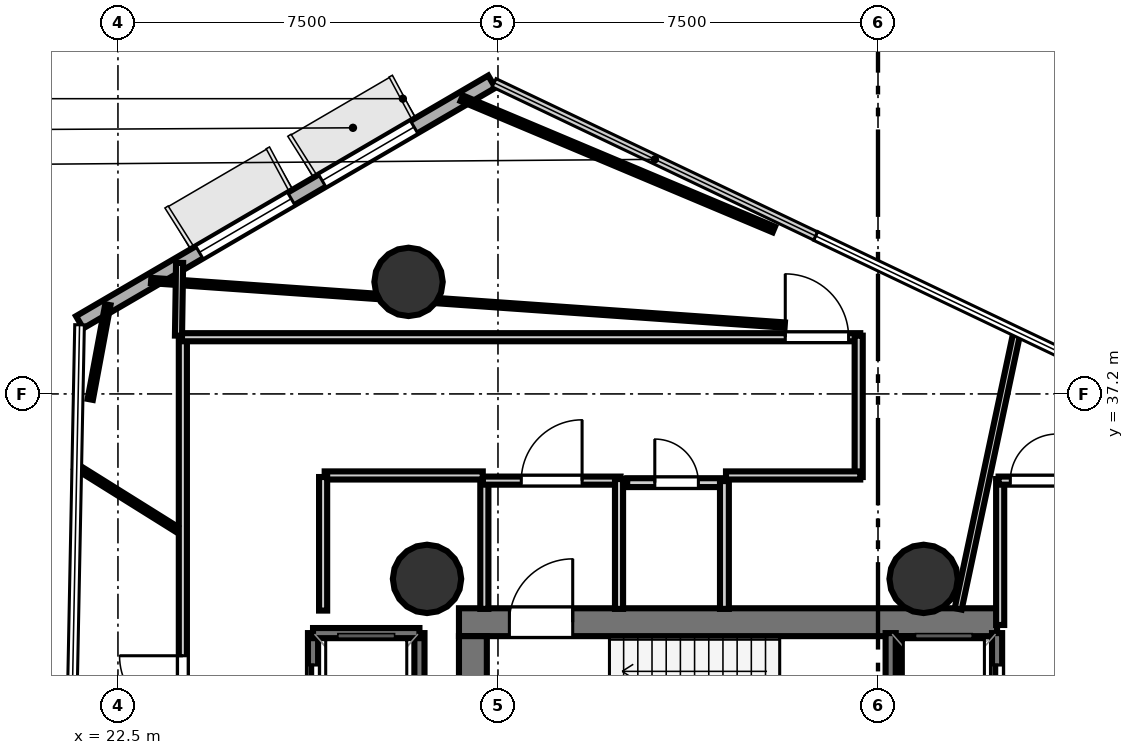
"""IFC4 building model, lengths in metres.
Left out: names, types, materials, properties, quantities, classifications, styles, units other than length and angle.
Written with IfcOpenShell. Run it as: python <this file> out.ifc"""

import sys

from ifc_helpers import new_model, si_unit, direction, frame, frame_2d, origin, origin_2d, place, context, subcontext, project, spatial, rectangle, hollow_circle, extrude, element, fill, save


model = new_model("IFC4")
c1 = context("Model", 3, precision=1e-05, world=origin(), true_north=direction((0.0, 1.0)))
c2 = subcontext(c1, "Body", "Model", "MODEL_VIEW")
j1 = project(units=[si_unit("LENGTHUNIT", "METRE"), si_unit("PLANEANGLEUNIT", "RADIAN")], contexts=[c1])
p1 = place(None, origin())
s1 = spatial("IfcSite", under=j1, at=p1, CompositionType="ELEMENT")
p2 = place(p1, origin())
s2 = spatial("IfcBuilding", under=s1, at=p2, CompositionType="ELEMENT")
p3 = place(p2, frame((0.0, 0.0, 143.1)))
s3 = spatial("IfcBuildingStorey", under=s2, at=p3, CompositionType="ELEMENT", Elevation=143.1)
p4 = place(p3, frame((29.23, 32.695, 0.0), z_axis=(0.0, 0.0, 1.0), x_axis=(1.0, 0.0, 0.0)))
e1 = element("IfcWall", 1, at=p4, inside=s3, PredefinedType="SHEAR", context=c2, shape_type="SweptSolid", body=[
    extrude(rectangle(XDim=10.62, YDim=0.55, at=frame_2d((5.31, 0.0))), origin(), (0.0, 0.0, 1.0), 4.32),
])
p5 = place(p4, frame((0.995, 0.0, 0.0)))
e2 = element("IfcOpeningElement", 2, at=p5, cuts=e1, PredefinedType="OPENING", context=c2, shape_type="SweptSolid", body=[
    extrude(rectangle(XDim=1.25, YDim=2.15, at=frame_2d((0.625, 1.075))), frame((0.0, 0.285, 0.0), z_axis=(0.0, -1.0, 0.0), x_axis=(1.0, 0.0, 0.0)), (0.0, 0.0, 1.0), 0.57),
])
p6 = place(p3, frame((29.505, 24.98, 0.0), z_axis=(0.0, 0.0, 1.0), x_axis=(0.0, 1.0, 0.0)))
e3 = element("IfcWall", 3, at=p6, inside=s3, PredefinedType="SHEAR", context=c2, shape_type="SweptSolid", body=[
    extrude(rectangle(XDim=7.44, YDim=0.55, at=frame_2d((3.72, 0.0))), origin(), (0.0, 0.0, 1.0), 4.32),
])
p7 = place(p3, frame((38.18, 24.98, 0.0), z_axis=(0.0, 0.0, 1.0), x_axis=(0.0, 1.0, 0.0)))
e4 = element("IfcWall", 4, at=p7, inside=s3, PredefinedType="SHEAR", context=c2, shape_type="SweptSolid", body=[
    extrude(rectangle(XDim=7.44, YDim=0.5, at=frame_2d((3.72, 0.0))), origin(), (0.0, 0.0, 1.0), 4.32),
])
for number, where, z_axis, x_axis in (
    (5, (28.6, 33.55, 0.0), (0.0, 0.0, 1.0), (1.0, 0.0, 0.0)),
    (6, (38.4, 33.55, 0.0), (0.0, 0.0, 1.0), (1.0, 0.0, 0.0)),
):
    element("IfcColumn", number, at=place(p3, frame(where, z_axis=z_axis, x_axis=x_axis)), inside=s3, PredefinedType="COLUMN", context=c2, shape_type="SweptSolid", body=[
        extrude(hollow_circle(Radius=0.675, WallThickness=0.032, at=origin_2d()), origin(), (0.0, 0.0, 1.0), 4.5),
    ])
p8 = place(p3, frame((28.235, 39.411, -0.27), z_axis=(0.0, 0.0, 1.0), x_axis=(1.0, 0.0, 0.0)))
e7 = element("IfcColumn", 7, at=p8, inside=s3, PredefinedType="COLUMN", context=c2, shape_type="SweptSolid", body=[
    extrude(hollow_circle(Radius=0.675, WallThickness=0.032, at=origin_2d()), origin(), (0.0, 0.0, 1.0), 4.77),
])
p9 = place(p3, frame((29.878, 43.362, 0.0), z_axis=(0.0, 0.0, 1.0), x_axis=(-0.863698041635, -0.504009615857, 0.0)))
e8 = element("IfcWall", 8, at=p9, inside=s3, PredefinedType="SOLIDWALL", context=c2, shape_type="SweptSolid", body=[
    extrude(rectangle(XDim=9.419, YDim=0.28, at=frame_2d((4.709, 0.0))), origin(), (0.0, 0.0, 1.0), 4.32),
])
p10 = place(p9, frame((1.776, 0.0, 0.85)))
e9 = element("IfcOpeningElement", 9, at=p10, cuts=e8, PredefinedType="OPENING", context=c2, shape_type="SweptSolid", body=[
    extrude(rectangle(XDim=2.1, YDim=2.2, at=frame_2d((1.05, 1.1))), frame((0.0, 0.15, 0.0), z_axis=(0.0, -1.0, 0.0), x_axis=(1.0, 0.0, 0.0)), (0.0, 0.0, 1.0), 0.3),
])
p11 = place(p9, frame((4.583, 0.0, 0.85)))
e10 = element("IfcOpeningElement", 10, at=p11, cuts=e8, PredefinedType="OPENING", context=c2, shape_type="SweptSolid", body=[
    extrude(rectangle(XDim=2.1, YDim=2.2, at=frame_2d((1.05, 1.1))), frame((0.0, 0.15, 0.0), z_axis=(0.0, -1.0, 0.0), x_axis=(1.0, 0.0, 0.0)), (0.0, 0.0, 1.0), 0.3),
])
p12 = place(p3, frame((39.85, 30.12, 0.0), z_axis=(0.0, 0.0, 1.0), x_axis=(0.0, 1.0, 0.0)))
e11 = element("IfcWall", 11, at=p12, inside=s3, PredefinedType="SOLIDWALL", context=c2, shape_type="SweptSolid", body=[
    extrude(rectangle(XDim=2.36, YDim=0.2, at=frame_2d((1.18, 0.0))), origin(), (0.0, 0.0, 1.0), 4.32),
])
p13 = place(p12, frame((0.63, 0.0, 0.0)))
e12 = element("IfcOpeningElement", 12, at=p13, cuts=e11, PredefinedType="OPENING", context=c2, shape_type="SweptSolid", body=[
    extrude(rectangle(XDim=1.1, YDim=2.15, at=frame_2d((0.55, 1.075))), frame((0.0, 0.11, 0.0), z_axis=(0.0, -1.0, 0.0), x_axis=(1.0, 0.0, 0.0)), (0.0, 0.0, 1.0), 0.22),
])
for number, where, z_axis, x_axis in (
    (13, (37.75, 30.12, 0.0), (0.0, 0.0, 1.0), (0.0, 1.0, 0.0)),
    (14, (28.45, 30.12, 0.0), (0.0, 0.0, 1.0), (0.0, 1.0, 0.0)),
):
    element("IfcWall", number, at=place(p3, frame(where, z_axis=z_axis, x_axis=x_axis)), inside=s3, PredefinedType="SOLIDWALL", context=c2, shape_type="SweptSolid", body=[
        extrude(rectangle(XDim=2.36, YDim=0.2, at=frame_2d((1.18, 0.0))), origin(), (0.0, 0.0, 1.0), 4.32),
    ])
p14 = place(p3, frame((26.35, 30.12, 0.0), z_axis=(0.0, 0.0, 1.0), x_axis=(0.0, 1.0, 0.0)))
e15 = element("IfcWall", 15, at=p14, inside=s3, PredefinedType="SOLIDWALL", context=c2, shape_type="SweptSolid", body=[
    extrude(rectangle(XDim=2.36, YDim=0.2, at=frame_2d((1.18, 0.0))), origin(), (0.0, 0.0, 1.0), 4.32),
])
p15 = place(p14, frame((0.63, 0.0, 0.0)))
e16 = element("IfcOpeningElement", 16, at=p15, cuts=e15, PredefinedType="OPENING", context=c2, shape_type="SweptSolid", body=[
    extrude(rectangle(XDim=1.1, YDim=2.15, at=frame_2d((0.55, 1.075))), frame((0.0, 0.11, 0.0), z_axis=(0.0, -1.0, 0.0), x_axis=(1.0, 0.0, 0.0)), (0.0, 0.0, 1.0), 0.22),
])
p16 = place(p3, frame((26.35, 32.48, 0.0), z_axis=(0.0, 0.0, 1.0), x_axis=(1.0, 0.0, 0.0)))
e17 = element("IfcWall", 17, at=p16, inside=s3, PredefinedType="SOLIDWALL", context=c2, shape_type="SweptSolid", body=[
    extrude(rectangle(XDim=2.1, YDim=0.2, at=frame_2d((1.05, 0.0))), origin(), (0.0, 0.0, 1.0), 4.32),
])
p17 = place(p3, frame((29.731, 32.958, 0.0), z_axis=(0.0, 0.0, 1.0), x_axis=(0.0, 1.0, 0.0)))
e18 = element("IfcWall", 18, at=p17, inside=s3, PredefinedType="PARTITIONING", context=c2, shape_type="SweptSolid", body=[
    extrude(rectangle(XDim=2.562, YDim=0.16, at=frame_2d((1.281, 0.0))), origin(), (0.0, 0.0, 1.0), 3.64),
])
p18 = place(p3, frame((29.7, 35.489, 0.0), z_axis=(0.0, 0.0, 1.0), x_axis=(1.0, 0.0, 0.0)))
e19 = element("IfcWall", 19, at=p18, inside=s3, PredefinedType="PARTITIONING", context=c2, shape_type="SweptSolid", body=[
    extrude(rectangle(XDim=2.72, YDim=0.16, at=frame_2d((1.36, 0.0))), origin(), (0.0, 0.0, 1.0), 3.64),
])
p19 = place(p18, frame((0.76, 0.0, 0.0)))
e20 = element("IfcOpeningElement", 20, at=p19, cuts=e19, PredefinedType="OPENING", context=c2, shape_type="SweptSolid", body=[
    extrude(rectangle(XDim=1.2, YDim=2.15, at=frame_2d((0.6, 1.075))), frame((0.0, 0.09, 0.0), z_axis=(0.0, -1.0, 0.0), x_axis=(1.0, 0.0, 0.0)), (0.0, 0.0, 1.0), 0.18),
])
p20 = place(p3, frame((32.389, 35.52, 0.0), z_axis=(0.0, 0.0, 1.0), x_axis=(0.0, -1.0, 0.0)))
e21 = element("IfcWall", 21, at=p20, inside=s3, PredefinedType="PARTITIONING", context=c2, shape_type="SweptSolid", body=[
    extrude(rectangle(XDim=2.562, YDim=0.16, at=frame_2d((1.281, 0.0))), origin(), (0.0, 0.0, 1.0), 3.64),
])
p21 = place(p3, frame((39.911, 32.64, 0.0), z_axis=(0.0, 0.0, 1.0), x_axis=(0.0, 1.0, 0.0)))
e22 = element("IfcWall", 22, at=p21, inside=s3, PredefinedType="PARTITIONING", context=c2, shape_type="SweptSolid", body=[
    extrude(rectangle(XDim=2.88, YDim=0.16, at=frame_2d((1.44, 0.0))), origin(), (0.0, 0.0, 1.0), 3.64),
])
p22 = place(p3, frame((39.88, 35.489, 0.0), z_axis=(0.0, 0.0, 1.0), x_axis=(1.0, 0.0, 0.0)))
e23 = element("IfcWall", 23, at=p22, inside=s3, PredefinedType="PARTITIONING", context=c2, shape_type="SweptSolid", body=[
    extrude(rectangle(XDim=1.383, YDim=0.16, at=frame_2d((0.691, 0.0))), origin(), (0.0, 0.0, 1.0), 3.64),
])
p23 = place(p22, frame((0.231, 0.0, 0.0)))
e24 = element("IfcOpeningElement", 24, at=p23, cuts=e23, PredefinedType="OPENING", context=c2, shape_type="SweptSolid", body=[
    extrude(rectangle(XDim=0.92, YDim=2.1, at=frame_2d((0.46, 1.05))), frame((0.0, 0.09, 0.0), z_axis=(0.0, -1.0, 0.0), x_axis=(1.0, 0.0, 0.0)), (0.0, 0.0, 1.0), 0.18),
])
p24 = place(p3, frame((32.55, 35.449, 0.0), z_axis=(0.0, 0.0, 1.0), x_axis=(1.0, 0.0, 0.0)))
e25 = element("IfcWall", 25, at=p24, inside=s3, PredefinedType="PLUMBINGWALL", context=c2, shape_type="SweptSolid", body=[
    extrude(rectangle(XDim=1.95, YDim=0.175, at=frame_2d((0.975, 0.0))), origin(), (0.0, 0.0, 1.0), 3.64),
])
p25 = place(p24, frame((0.545, 0.0, 0.0)))
e26 = element("IfcOpeningElement", 26, at=p25, cuts=e25, PredefinedType="OPENING", context=c2, shape_type="SweptSolid", body=[
    extrude(rectangle(XDim=0.86, YDim=2.05, at=frame_2d((0.43, 1.025))), frame((0.0, 0.097, 0.0), z_axis=(0.0, -1.0, 0.0), x_axis=(1.0, 0.0, 0.0)), (0.0, 0.0, 1.0), 0.195),
])
p26 = place(p3, frame((34.469, 35.48, 0.0), z_axis=(0.0, 0.0, 1.0), x_axis=(0.0, -1.0, 0.0)))
e27 = element("IfcWall", 27, at=p26, inside=s3, PredefinedType="PLUMBINGWALL", context=c2, shape_type="SweptSolid", body=[
    extrude(rectangle(XDim=2.522, YDim=0.175, at=frame_2d((1.261, 0.0))), origin(), (0.0, 0.0, 1.0), 3.64),
])
p27 = place(p3, frame((23.781, 25.762, 0.0), z_axis=(0.0, 0.0, 1.0), x_axis=(0.0, 1.0, 0.0)))
e28 = element("IfcWall", 28, at=p27, inside=s3, PredefinedType="PARTITIONING", context=c2, shape_type="SweptSolid", body=[
    extrude(rectangle(XDim=12.588, YDim=0.16, at=frame_2d((6.294, 0.0))), origin(), (0.0, 0.0, 1.0), 3.64),
])
p28 = place(p27, frame((5.021, 0.0, 0.0)))
e29 = element("IfcOpeningElement", 29, at=p28, cuts=e28, PredefinedType="OPENING", context=c2, shape_type="SweptSolid", body=[
    extrude(rectangle(XDim=1.25, YDim=2.2, at=frame_2d((0.625, 1.1))), frame((0.0, 0.09, 0.0), z_axis=(0.0, -1.0, 0.0), x_axis=(1.0, 0.0, 0.0)), (0.0, 0.0, 1.0), 0.18),
])
p29 = place(p3, frame((23.75, 38.319, 0.0), z_axis=(0.0, 0.0, 1.0), x_axis=(1.0, 0.0, 0.0)))
e30 = element("IfcWall", 30, at=p29, inside=s3, PredefinedType="PARTITIONING", context=c2, shape_type="SweptSolid", body=[
    extrude(rectangle(XDim=13.4, YDim=0.16, at=frame_2d((6.7, 0.0))), origin(), (0.0, 0.0, 1.0), 3.64),
])
p30 = place(p29, frame((11.92, 0.0, 0.0)))
e31 = element("IfcOpeningElement", 31, at=p30, cuts=e30, PredefinedType="OPENING", context=c2, shape_type="SweptSolid", body=[
    extrude(rectangle(XDim=1.25, YDim=2.2, at=frame_2d((0.625, 1.1))), frame((0.0, 0.09, 0.0), z_axis=(0.0, -1.0, 0.0), x_axis=(1.0, 0.0, 0.0)), (0.0, 0.0, 1.0), 0.18),
])
p31 = place(p3, frame((37.119, 38.35, 0.0), z_axis=(0.0, 0.0, 1.0), x_axis=(0.0, -1.0, 0.0)))
e32 = element("IfcWall", 32, at=p31, inside=s3, PredefinedType="PARTITIONING", context=c2, shape_type="SweptSolid", body=[
    extrude(rectangle(XDim=2.79, YDim=0.16, at=frame_2d((1.395, 0.0))), origin(), (0.0, 0.0, 1.0), 3.64),
])
p32 = place(p3, frame((37.15, 35.591, 0.0), z_axis=(0.0, 0.0, 1.0), x_axis=(-1.0, 0.0, 0.0)))
e33 = element("IfcWall", 33, at=p32, inside=s3, PredefinedType="PARTITIONING", context=c2, shape_type="SweptSolid", body=[
    extrude(rectangle(XDim=2.65, YDim=0.16, at=frame_2d((1.325, 0.0))), origin(), (0.0, 0.0, 1.0), 3.64),
])
p33 = place(p3, frame((29.7, 35.591, 0.0), z_axis=(0.0, 0.0, 1.0), x_axis=(-1.0, 0.0, 0.0)))
e34 = element("IfcWall", 34, at=p33, inside=s3, PredefinedType="PARTITIONING", context=c2, shape_type="SweptSolid", body=[
    extrude(rectangle(XDim=3.12, YDim=0.16, at=frame_2d((1.56, 0.0))), origin(), (0.0, 0.0, 1.0), 3.64),
])
p34 = place(p3, frame((26.549, 35.56, 0.0), z_axis=(0.0, 0.0, 1.0), x_axis=(0.0, -1.0, 0.0)))
e35 = element("IfcWall", 35, at=p34, inside=s3, PredefinedType="PARTITIONING", context=c2, shape_type="SweptSolid", body=[
    extrude(rectangle(XDim=2.636, YDim=0.16, at=frame_2d((1.318, 0.0))), origin(), (0.0, 0.0, 1.0), 3.64),
])
p35 = place(p3, frame((21.67, 35.772, 0.0), z_axis=(0.0, 0.0, 1.0), x_axis=(0.848086274525, -0.529858161174, 0.0)))
e36 = element("IfcWall", 36, at=p35, inside=s3, PredefinedType="PARTITIONING", context=c2, shape_type="SweptSolid", body=[
    extrude(rectangle(XDim=2.338, YDim=0.105, at=frame_2d((1.169, 0.0))), origin(), (0.0, 0.0, 1.0), 3.64),
])
p36 = place(p3, frame((39.082, 32.958, 0.0), z_axis=(0.0, 0.0, 1.0), x_axis=(0.207932173696, 0.978143246739, 0.0)))
e37 = element("IfcWall", 37, at=p36, inside=s3, PredefinedType="PARTITIONING", context=c2, shape_type="SweptSolid", body=[
    extrude(rectangle(XDim=5.608, YDim=0.14, at=frame_2d((2.804, 0.0))), origin(), (0.0, 0.0, 1.0), 3.64),
])
p37 = place(p3, frame((35.66, 38.559, 0.0), z_axis=(0.0, 0.0, 1.0), x_axis=(-0.997539311486, 0.070109357724, 0.0)))
e38 = element("IfcWall", 38, at=p37, inside=s3, PredefinedType="PARTITIONING", context=c2, shape_type="SweptSolid", body=[
    extrude(rectangle(XDim=12.536, YDim=0.105, at=frame_2d((6.268, 0.0))), origin(), (0.0, 0.0, 1.0), 3.64),
])
p38 = place(p3, frame((23.717, 39.786, 0.0), z_axis=(0.0, 0.0, 1.0), x_axis=(-0.0153017281, -0.999882921705, 0.0)))
e39 = element("IfcWall", 39, at=p38, inside=s3, PredefinedType="PARTITIONING", context=c2, shape_type="SweptSolid", body=[
    extrude(rectangle(XDim=1.436, YDim=0.14, at=frame_2d((0.718, 0.0))), origin(), (0.0, 0.0, 1.0), 3.64),
])
p39 = place(p3, frame((21.954, 37.092, 0.0), z_axis=(0.0, 0.0, 1.0), x_axis=(0.182853037129, 0.983140257956, 0.0)))
e40 = element("IfcWall", 40, at=p39, inside=s3, PredefinedType="PARTITIONING", context=c2, shape_type="SweptSolid", body=[
    extrude(rectangle(XDim=1.9, YDim=0.105, at=frame_2d((0.95, 0.0))), origin(), (0.0, 0.0, 1.0), 3.64),
])
p40 = place(p3, frame((29.284, 43.034, 0.0), z_axis=(0.0, 0.0, 1.0), x_axis=(0.921833329639, -0.387586522426, 0.0)))
e41 = element("IfcWall", 41, at=p40, inside=s3, PredefinedType="PARTITIONING", context=c2, shape_type="SweptSolid", body=[
    extrude(rectangle(XDim=6.682, YDim=0.12, at=frame_2d((3.341, 0.0))), origin(), (0.0, 0.0, 1.0), 3.64),
])
p41 = place(p5, origin())
e42 = element("IfcDoor", 42, at=p41, inside=s3, OperationType="SINGLE_SWING_RIGHT", PredefinedType="DOOR", context=c2, shape_type="SweptSolid", body=[
    extrude(rectangle(XDim=1.25, YDim=2.15, at=frame_2d((0.625, 1.075))), frame((0.0, 0.025, 0.0), z_axis=(0.0, -1.0, 0.0), x_axis=(1.0, 0.0, 0.0)), (0.0, 0.0, 1.0), 0.05),
])
fill(e2, e42)
p42 = place(p13, origin())
e43 = element("IfcDoor", 43, at=p42, inside=s3, OperationType="SLIDING_TO_LEFT", PredefinedType="DOOR", context=c2, shape_type="SweptSolid", body=[
    extrude(rectangle(XDim=1.1, YDim=2.15, at=frame_2d((0.55, 1.075))), frame((0.0, 0.025, 0.0), z_axis=(0.0, -1.0, 0.0), x_axis=(1.0, 0.0, 0.0)), (0.0, 0.0, 1.0), 0.05),
])
fill(e12, e43)
p43 = place(p15, origin())
e44 = element("IfcDoor", 44, at=p43, inside=s3, OperationType="SLIDING_TO_LEFT", PredefinedType="DOOR", context=c2, shape_type="SweptSolid", body=[
    extrude(rectangle(XDim=1.1, YDim=2.15, at=frame_2d((0.55, 1.075))), frame((0.0, 0.025, 0.0), z_axis=(0.0, -1.0, 0.0), x_axis=(1.0, 0.0, 0.0)), (0.0, 0.0, 1.0), 0.05),
])
fill(e16, e44)
p44 = place(p19, origin())
e45 = element("IfcDoor", 45, at=p44, inside=s3, OperationType="SINGLE_SWING_RIGHT", PredefinedType="DOOR", context=c2, shape_type="SweptSolid", body=[
    extrude(rectangle(XDim=1.2, YDim=2.15, at=frame_2d((0.6, 1.075))), frame((0.0, 0.025, 0.0), z_axis=(0.0, -1.0, 0.0), x_axis=(1.0, 0.0, 0.0)), (0.0, 0.0, 1.0), 0.05),
])
fill(e20, e45)
p45 = place(p25, origin())
e46 = element("IfcDoor", 46, at=p45, inside=s3, OperationType="SINGLE_SWING_LEFT", PredefinedType="DOOR", context=c2, shape_type="SweptSolid", body=[
    extrude(rectangle(XDim=0.86, YDim=2.05, at=frame_2d((0.43, 1.025))), frame((0.0, 0.025, 0.0), z_axis=(0.0, -1.0, 0.0), x_axis=(1.0, 0.0, 0.0)), (0.0, 0.0, 1.0), 0.05),
])
fill(e26, e46)
p46 = place(p28, origin())
e47 = element("IfcDoor", 47, at=p46, inside=s3, OperationType="SINGLE_SWING_RIGHT", PredefinedType="DOOR", context=c2, shape_type="SweptSolid", body=[
    extrude(rectangle(XDim=1.25, YDim=2.2, at=frame_2d((0.625, 1.1))), frame((0.0, 0.025, 0.0), z_axis=(0.0, -1.0, 0.0), x_axis=(1.0, 0.0, 0.0)), (0.0, 0.0, 1.0), 0.05),
])
fill(e29, e47)
p47 = place(p23, origin())
e48 = element("IfcDoor", 48, at=p47, inside=s3, OperationType="SINGLE_SWING_RIGHT", PredefinedType="DOOR", context=c2, shape_type="SweptSolid", body=[
    extrude(rectangle(XDim=0.92, YDim=2.1, at=frame_2d((0.46, 1.05))), frame((0.0, 0.025, 0.0), z_axis=(0.0, -1.0, 0.0), x_axis=(1.0, 0.0, 0.0)), (0.0, 0.0, 1.0), 0.05),
])
fill(e24, e48)
p48 = place(p30, origin())
e49 = element("IfcDoor", 49, at=p48, inside=s3, OperationType="SINGLE_SWING_LEFT", PredefinedType="DOOR", context=c2, shape_type="SweptSolid", body=[
    extrude(rectangle(XDim=1.25, YDim=2.2, at=frame_2d((0.625, 1.1))), frame((0.0, 0.025, 0.0), z_axis=(0.0, -1.0, 0.0), x_axis=(1.0, 0.0, 0.0)), (0.0, 0.0, 1.0), 0.05),
])
fill(e31, e49)
p49 = place(p10, origin())
e50 = element("IfcWindow", 50, at=p49, inside=s3, PartitioningType="SINGLE_PANEL", PredefinedType="WINDOW", context=c2, shape_type="SweptSolid", body=[
    extrude(rectangle(XDim=2.1, YDim=2.2, at=frame_2d((1.05, 1.1))), frame((0.0, 0.03, 0.0), z_axis=(0.0, -1.0, 0.0), x_axis=(1.0, 0.0, 0.0)), (0.0, 0.0, 1.0), 0.06),
])
fill(e9, e50)
p50 = place(p11, origin())
e51 = element("IfcWindow", 51, at=p50, inside=s3, PartitioningType="SINGLE_PANEL", PredefinedType="WINDOW", context=c2, shape_type="SweptSolid", body=[
    extrude(rectangle(XDim=2.1, YDim=2.2, at=frame_2d((1.05, 1.1))), frame((0.0, 0.03, 0.0), z_axis=(0.0, -1.0, 0.0), x_axis=(1.0, 0.0, 0.0)), (0.0, 0.0, 1.0), 0.06),
])
fill(e10, e51)
save(model, sys.argv[1])
